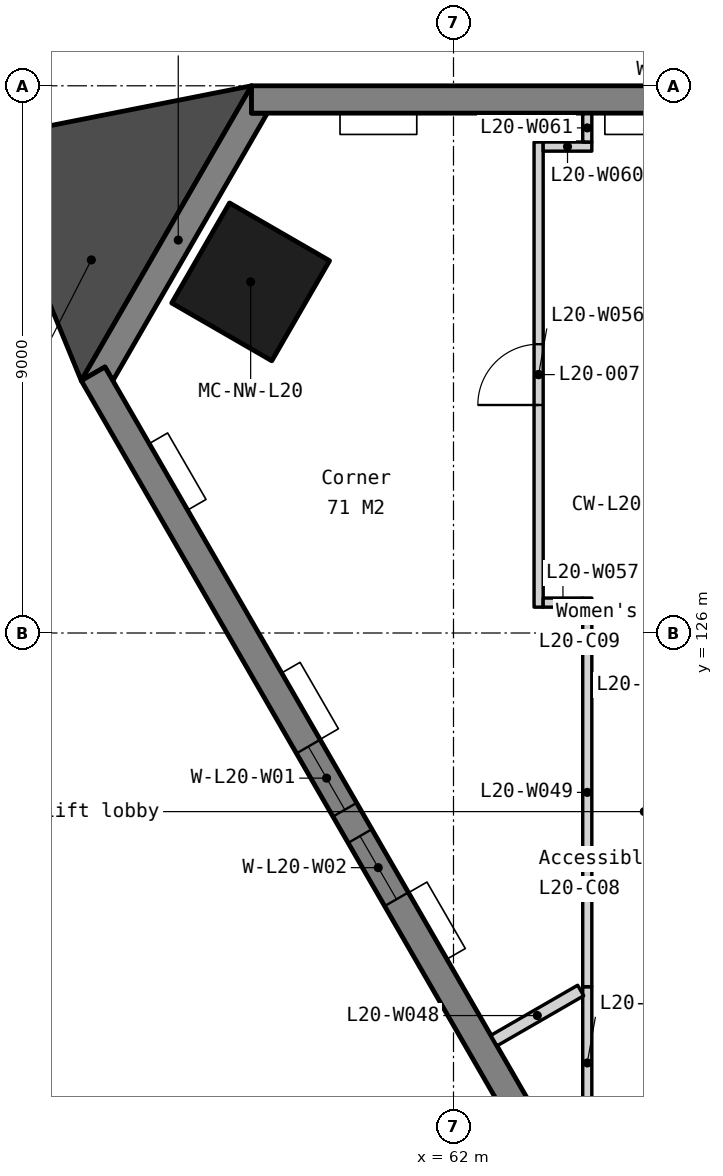
"""IFC4 building model, lengths in metres.
Left out: names, types, materials, properties, quantities, classifications, styles, units other than length and angle.
Written with IfcOpenShell. Run it as: python <this file> out.ifc"""

import sys

from ifc_helpers import new_model, si_unit, direction, frame, frame_2d, origin, origin_2d, place, context, subcontext, project, spatial, polyline, rectangle, outline, extrude, element, fill, save


model = new_model("IFC4")
c1 = context("Model", 3, precision=1e-05, world=origin(), true_north=direction((0.0, 1.0)))
c2 = subcontext(c1, "Body", "Model", "MODEL_VIEW")
j1 = project(units=[si_unit("LENGTHUNIT", "METRE"), si_unit("PLANEANGLEUNIT", "RADIAN")], contexts=[c1])
p1 = place(None, origin())
s1 = spatial("IfcSite", under=j1, at=p1, CompositionType="ELEMENT")
p2 = place(p1, origin())
s2 = spatial("IfcBuilding", under=s1, at=p2, CompositionType="ELEMENT")
p3 = place(p2, frame((0.0, 0.0, 85.3)))
s3 = spatial("IfcBuildingStorey", under=s2, at=p3, CompositionType="ELEMENT", Elevation=85.3)
p4 = place(p3, frame((58.664, 131.775, 0.0), z_axis=(0.0, 0.0, 1.0), x_axis=(-0.5, -0.866025403784, 0.0)))
e1 = element("IfcColumn", 1, at=p4, inside=s3, PredefinedType="COLUMN", context=c2, shape_type="SweptSolid", body=[
    extrude(rectangle(XDim=1.9, YDim=1.9, at=origin_2d()), origin(), (0.0, 0.0, 1.0), 3.5),
])
p5 = place(p3, frame((0.0, 0.0, -0.15)))
e2 = element("IfcWall", 2, at=p5, inside=s3, PredefinedType="SOLIDWALL", context=c2, shape_type="SweptSolid", body=[
    extrude(outline(polyline([(58.678, 135.0), (58.678, 134.55), (58.938, 134.55), (56.398, 130.15), (56.268, 130.375), (55.878, 130.15), (58.678, 135.0)])), origin(), (0.0, 0.0, 1.0), 3.5),
])
p6 = place(p3, frame((101.322, 134.775, -0.15), z_axis=(0.0, 0.0, 1.0), x_axis=(-1.0, 0.0, 0.0)))
e3 = element("IfcWall", 3, at=p6, inside=s3, PredefinedType="SOLIDWALL", context=c2, shape_type="SweptSolid", body=[
    extrude(outline(polyline([(42.643, 0.0), (42.643, 3.5), (0.0, 3.5), (0.0, 0.0), (42.643, 0.0)])), frame((0.0, 0.225, 0.0), z_axis=(0.0, -1.0, 0.0), x_axis=(1.0, 0.0, 0.0)), (0.0, 0.0, 1.0), 0.45),
])
p7 = place(p6, frame((7.079, 0.0, 1.05)))
e4 = element("IfcOpeningElement", 4, at=p7, cuts=e3, PredefinedType="OPENING", context=c2, shape_type="SweptSolid", body=[
    extrude(rectangle(XDim=1.2, YDim=1.5, at=frame_2d((0.6, 0.75))), frame((0.0, 0.235, 0.0), z_axis=(0.0, -1.0, 0.0), x_axis=(1.0, 0.0, 0.0)), (0.0, 0.0, 1.0), 0.47),
])
p8 = place(p6, frame((8.779, 0.0, 1.05)))
e5 = element("IfcOpeningElement", 5, at=p8, cuts=e3, PredefinedType="OPENING", context=c2, shape_type="SweptSolid", body=[
    extrude(rectangle(XDim=1.2, YDim=1.5, at=frame_2d((0.6, 0.75))), frame((0.0, 0.235, 0.0), z_axis=(0.0, -1.0, 0.0), x_axis=(1.0, 0.0, 0.0)), (0.0, 0.0, 1.0), 0.47),
])
p9 = place(p6, frame((15.607, 0.0, 1.05)))
e6 = element("IfcOpeningElement", 6, at=p9, cuts=e3, PredefinedType="OPENING", context=c2, shape_type="SweptSolid", body=[
    extrude(rectangle(XDim=1.2, YDim=1.5, at=frame_2d((0.6, 0.75))), frame((0.0, 0.235, 0.0), z_axis=(0.0, -1.0, 0.0), x_axis=(1.0, 0.0, 0.0)), (0.0, 0.0, 1.0), 0.47),
])
p10 = place(p6, frame((17.307, 0.0, 1.05)))
e7 = element("IfcOpeningElement", 7, at=p10, cuts=e3, PredefinedType="OPENING", context=c2, shape_type="SweptSolid", body=[
    extrude(rectangle(XDim=1.2, YDim=1.5, at=frame_2d((0.6, 0.75))), frame((0.0, 0.235, 0.0), z_axis=(0.0, -1.0, 0.0), x_axis=(1.0, 0.0, 0.0)), (0.0, 0.0, 1.0), 0.47),
])
p11 = place(p6, frame((24.136, 0.0, 1.05)))
e8 = element("IfcOpeningElement", 8, at=p11, cuts=e3, PredefinedType="OPENING", context=c2, shape_type="SweptSolid", body=[
    extrude(rectangle(XDim=1.2, YDim=1.5, at=frame_2d((0.6, 0.75))), frame((0.0, 0.235, 0.0), z_axis=(0.0, -1.0, 0.0), x_axis=(1.0, 0.0, 0.0)), (0.0, 0.0, 1.0), 0.47),
])
p12 = place(p6, frame((25.836, 0.0, 1.05)))
e9 = element("IfcOpeningElement", 9, at=p12, cuts=e3, PredefinedType="OPENING", context=c2, shape_type="SweptSolid", body=[
    extrude(rectangle(XDim=1.2, YDim=1.5, at=frame_2d((0.6, 0.75))), frame((0.0, 0.235, 0.0), z_axis=(0.0, -1.0, 0.0), x_axis=(1.0, 0.0, 0.0)), (0.0, 0.0, 1.0), 0.47),
])
p13 = place(p6, frame((32.665, 0.0, 1.05)))
e10 = element("IfcOpeningElement", 10, at=p13, cuts=e3, PredefinedType="OPENING", context=c2, shape_type="SweptSolid", body=[
    extrude(rectangle(XDim=1.2, YDim=1.5, at=frame_2d((0.6, 0.75))), frame((0.0, 0.235, 0.0), z_axis=(0.0, -1.0, 0.0), x_axis=(1.0, 0.0, 0.0)), (0.0, 0.0, 1.0), 0.47),
])
p14 = place(p6, frame((34.365, 0.0, 1.05)))
e11 = element("IfcOpeningElement", 11, at=p14, cuts=e3, PredefinedType="OPENING", context=c2, shape_type="SweptSolid", body=[
    extrude(rectangle(XDim=1.2, YDim=1.5, at=frame_2d((0.6, 0.75))), frame((0.0, 0.235, 0.0), z_axis=(0.0, -1.0, 0.0), x_axis=(1.0, 0.0, 0.0)), (0.0, 0.0, 1.0), 0.47),
])
p15 = place(p3, frame((56.073, 130.263, -0.15), z_axis=(0.0, 0.0, 1.0), x_axis=(0.500000478905, -0.866025127289, 0.0)))
e12 = element("IfcWall", 12, at=p15, inside=s3, PredefinedType="SOLIDWALL", context=c2, shape_type="SweptSolid", body=[
    extrude(outline(polyline([(42.643, 0.0), (42.643, 3.5), (0.0, 3.5), (0.0, 0.0), (42.643, 0.0)])), frame((0.0, 0.225, 0.0), z_axis=(0.0, -1.0, 0.0), x_axis=(1.0, 0.0, 0.0)), (0.0, 0.0, 1.0), 0.45),
])
p16 = place(p15, frame((7.079, 0.0, 1.05)))
e13 = element("IfcOpeningElement", 13, at=p16, cuts=e12, PredefinedType="OPENING", context=c2, shape_type="SweptSolid", body=[
    extrude(rectangle(XDim=1.2, YDim=1.5, at=frame_2d((0.6, 0.75))), frame((0.0, 0.235, 0.0), z_axis=(0.0, -1.0, 0.0), x_axis=(1.0, 0.0, 0.0)), (0.0, 0.0, 1.0), 0.47),
])
p17 = place(p15, frame((8.779, 0.0, 1.05)))
e14 = element("IfcOpeningElement", 14, at=p17, cuts=e12, PredefinedType="OPENING", context=c2, shape_type="SweptSolid", body=[
    extrude(rectangle(XDim=1.2, YDim=1.5, at=frame_2d((0.6, 0.75))), frame((0.0, 0.235, 0.0), z_axis=(0.0, -1.0, 0.0), x_axis=(1.0, 0.0, 0.0)), (0.0, 0.0, 1.0), 0.47),
])
p18 = place(p15, frame((15.607, 0.0, 1.05)))
e15 = element("IfcOpeningElement", 15, at=p18, cuts=e12, PredefinedType="OPENING", context=c2, shape_type="SweptSolid", body=[
    extrude(rectangle(XDim=1.2, YDim=1.5, at=frame_2d((0.6, 0.75))), frame((0.0, 0.235, 0.0), z_axis=(0.0, -1.0, 0.0), x_axis=(1.0, 0.0, 0.0)), (0.0, 0.0, 1.0), 0.47),
])
p19 = place(p15, frame((17.307, 0.0, 1.05)))
e16 = element("IfcOpeningElement", 16, at=p19, cuts=e12, PredefinedType="OPENING", context=c2, shape_type="SweptSolid", body=[
    extrude(rectangle(XDim=1.2, YDim=1.5, at=frame_2d((0.6, 0.75))), frame((0.0, 0.235, 0.0), z_axis=(0.0, -1.0, 0.0), x_axis=(1.0, 0.0, 0.0)), (0.0, 0.0, 1.0), 0.47),
])
p20 = place(p15, frame((24.136, 0.0, 1.05)))
e17 = element("IfcOpeningElement", 17, at=p20, cuts=e12, PredefinedType="OPENING", context=c2, shape_type="SweptSolid", body=[
    extrude(rectangle(XDim=1.2, YDim=1.5, at=frame_2d((0.6, 0.75))), frame((0.0, 0.235, 0.0), z_axis=(0.0, -1.0, 0.0), x_axis=(1.0, 0.0, 0.0)), (0.0, 0.0, 1.0), 0.47),
])
p21 = place(p15, frame((25.836, 0.0, 1.05)))
e18 = element("IfcOpeningElement", 18, at=p21, cuts=e12, PredefinedType="OPENING", context=c2, shape_type="SweptSolid", body=[
    extrude(rectangle(XDim=1.2, YDim=1.5, at=frame_2d((0.6, 0.75))), frame((0.0, 0.235, 0.0), z_axis=(0.0, -1.0, 0.0), x_axis=(1.0, 0.0, 0.0)), (0.0, 0.0, 1.0), 0.47),
])
p22 = place(p15, frame((32.665, 0.0, 1.05)))
e19 = element("IfcOpeningElement", 19, at=p22, cuts=e12, PredefinedType="OPENING", context=c2, shape_type="SweptSolid", body=[
    extrude(rectangle(XDim=1.2, YDim=1.5, at=frame_2d((0.6, 0.75))), frame((0.0, 0.235, 0.0), z_axis=(0.0, -1.0, 0.0), x_axis=(1.0, 0.0, 0.0)), (0.0, 0.0, 1.0), 0.47),
])
p23 = place(p15, frame((34.365, 0.0, 1.05)))
e20 = element("IfcOpeningElement", 20, at=p23, cuts=e12, PredefinedType="OPENING", context=c2, shape_type="SweptSolid", body=[
    extrude(rectangle(XDim=1.2, YDim=1.5, at=frame_2d((0.6, 0.75))), frame((0.0, 0.235, 0.0), z_axis=(0.0, -1.0, 0.0), x_axis=(1.0, 0.0, 0.0)), (0.0, 0.0, 1.0), 0.47),
])
p24 = place(p3, frame((0.0, 0.0, -0.15)))
e21 = element("IfcWall", 21, at=p24, inside=s3, PredefinedType="SOLIDWALL", context=c2, shape_type="SweptSolid", body=[
    extrude(outline(polyline([(58.678, 135.0), (54.248, 134.122), (55.878, 130.15), (58.678, 135.0)])), origin(), (0.0, 0.0, 1.0), 3.5),
])
p25 = place(p3, frame((64.2, 117.675, 0.0), z_axis=(0.0, 0.0, 1.0), x_axis=(0.0, 1.0, 0.0)))
e22 = element("IfcWall", 22, at=p25, inside=s3, PredefinedType="PARTITIONING", context=c2, shape_type="SweptSolid", body=[
    extrude(rectangle(XDim=2.508, YDim=0.15, at=frame_2d((1.254, 0.0))), origin(), (0.0, 0.0, 1.0), 3.35),
])
p26 = place(p3, frame((62.665, 119.296, 0.0), z_axis=(0.0, 0.0, 1.0), x_axis=(0.866101713734, 0.499867803992, 0.0)))
e23 = element("IfcWall", 23, at=p26, inside=s3, PredefinedType="PARTITIONING", context=c2, shape_type="SweptSolid", body=[
    extrude(rectangle(XDim=1.648, YDim=0.2, at=frame_2d((0.824, 0.0))), origin(), (0.0, 0.0, 1.0), 3.35),
])
p27 = place(p3, frame((64.2, 120.183, 0.0), z_axis=(0.0, 0.0, 1.0), x_axis=(0.0, 1.0, 0.0)))
e24 = element("IfcWall", 24, at=p27, inside=s3, PredefinedType="PARTITIONING", context=c2, shape_type="SweptSolid", body=[
    extrude(rectangle(XDim=6.392, YDim=0.15, at=frame_2d((3.196, 0.0))), origin(), (0.0, 0.0, 1.0), 3.35),
])
p28 = place(p3, frame((63.4, 126.425, 0.0), z_axis=(0.0, 0.0, 1.0), x_axis=(0.0, 1.0, 0.0)))
e25 = element("IfcWall", 25, at=p28, inside=s3, PredefinedType="PARTITIONING", context=c2, shape_type="SweptSolid", body=[
    extrude(rectangle(XDim=7.65, YDim=0.15, at=frame_2d((3.825, 0.0))), origin(), (0.0, 0.0, 1.0), 3.35),
])
p29 = place(p28, frame((3.325, 0.0, 0.0)))
e26 = element("IfcOpeningElement", 26, at=p29, cuts=e25, PredefinedType="OPENING", context=c2, shape_type="SweptSolid", body=[
    extrude(rectangle(XDim=1.0, YDim=2.1, at=frame_2d((0.5, 1.05))), frame((0.0, 0.085, 0.0), z_axis=(0.0, -1.0, 0.0), x_axis=(1.0, 0.0, 0.0)), (0.0, 0.0, 1.0), 0.17),
])
p30 = place(p3, frame((63.475, 126.5, 0.0), z_axis=(0.0, 0.0, 1.0), x_axis=(1.0, 0.0, 0.0)))
e27 = element("IfcWall", 27, at=p30, inside=s3, PredefinedType="PARTITIONING", context=c2, shape_type="SweptSolid", body=[
    extrude(rectangle(XDim=0.65, YDim=0.15, at=frame_2d((0.325, 0.0))), origin(), (0.0, 0.0, 1.0), 3.35),
])
p31 = place(p3, frame((63.475, 134.0, 0.0), z_axis=(0.0, 0.0, 1.0), x_axis=(1.0, 0.0, 0.0)))
e28 = element("IfcWall", 28, at=p31, inside=s3, PredefinedType="PARTITIONING", context=c2, shape_type="SweptSolid", body=[
    extrude(rectangle(XDim=0.8, YDim=0.15, at=frame_2d((0.4, 0.0))), origin(), (0.0, 0.0, 1.0), 2.886),
])
p32 = place(p3, frame((64.2, 134.075, 0.0), z_axis=(0.0, 0.0, 1.0), x_axis=(0.0, 1.0, 0.0)))
e29 = element("IfcWall", 29, at=p32, inside=s3, PredefinedType="PARTITIONING", context=c2, shape_type="SweptSolid", body=[
    extrude(rectangle(XDim=0.465, YDim=0.15, at=frame_2d((0.232, 0.0))), origin(), (0.0, 0.0, 1.0), 3.35),
])
p33 = place(p16, origin())
e30 = element("IfcWindow", 30, at=p33, inside=s3, PartitioningType="SINGLE_PANEL", PredefinedType="WINDOW", context=c2, shape_type="SweptSolid", body=[
    extrude(rectangle(XDim=1.2, YDim=1.5, at=frame_2d((0.6, 0.75))), frame((0.0, 0.03, 0.0), z_axis=(0.0, -1.0, 0.0), x_axis=(1.0, 0.0, 0.0)), (0.0, 0.0, 1.0), 0.06),
])
fill(e13, e30)
p34 = place(p17, origin())
e31 = element("IfcWindow", 31, at=p34, inside=s3, PartitioningType="SINGLE_PANEL", PredefinedType="WINDOW", context=c2, shape_type="SweptSolid", body=[
    extrude(rectangle(XDim=1.2, YDim=1.5, at=frame_2d((0.6, 0.75))), frame((0.0, 0.03, 0.0), z_axis=(0.0, -1.0, 0.0), x_axis=(1.0, 0.0, 0.0)), (0.0, 0.0, 1.0), 0.06),
])
fill(e14, e31)
p35 = place(p29, origin())
e32 = element("IfcDoor", 32, at=p35, inside=s3, OperationType="SINGLE_SWING_LEFT", PredefinedType="DOOR", context=c2, shape_type="SweptSolid", body=[
    extrude(rectangle(XDim=1.0, YDim=2.1, at=frame_2d((0.5, 1.05))), frame((0.0, 0.025, 0.0), z_axis=(0.0, -1.0, 0.0), x_axis=(1.0, 0.0, 0.0)), (0.0, 0.0, 1.0), 0.05),
])
fill(e26, e32)
save(model, sys.argv[1])
